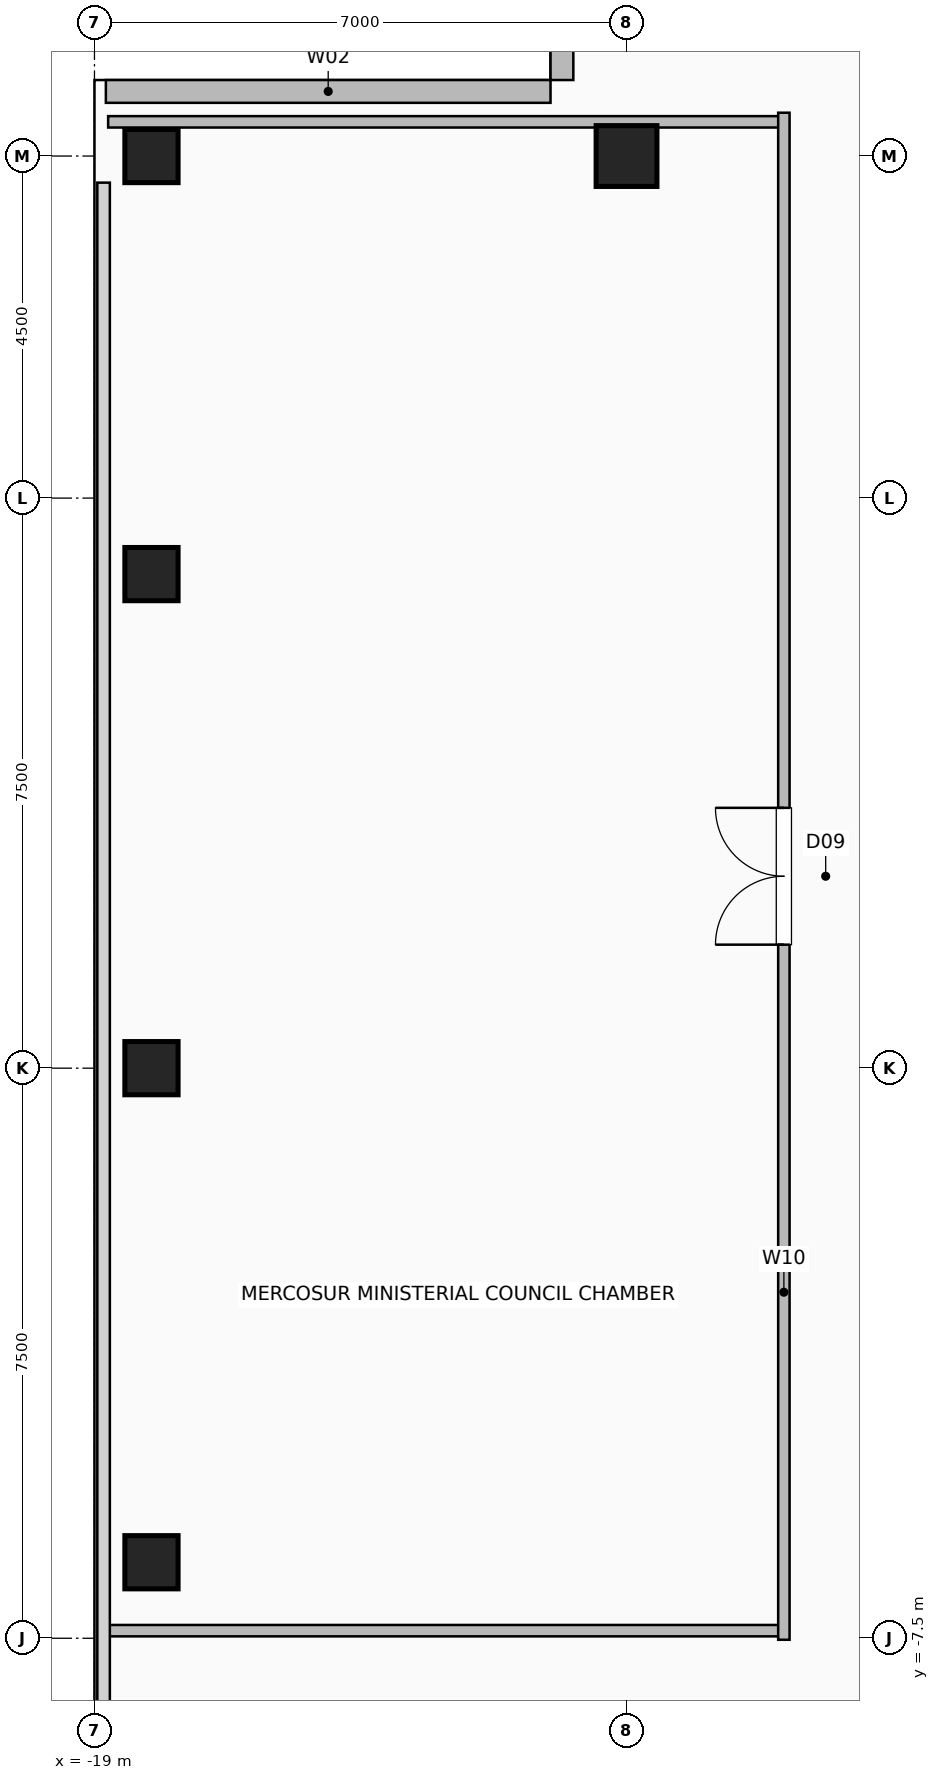
"""IFC4 building model, lengths in metres.
Left out: names, types, materials, properties, quantities, classifications, styles, units other than length and angle.
Written with IfcOpenShell. Run it as: python <this file> out.ifc"""

import sys

from ifc_helpers import new_model, si_unit, direction, frame, frame_2d, origin, origin_2d, place, context, subcontext, project, spatial, rectangle, hollow_rectangle, extrude, element, fill, save


model = new_model("IFC4")
c1 = context("Model", 3, precision=1e-05, world=origin(), true_north=direction((0.0, 1.0)))
c2 = subcontext(c1, "Body", "Model", "MODEL_VIEW")
j1 = project(units=[si_unit("LENGTHUNIT", "METRE"), si_unit("PLANEANGLEUNIT", "RADIAN")], contexts=[c1])
p1 = place(None, origin())
s1 = spatial("IfcSite", under=j1, at=p1, CompositionType="ELEMENT")
p2 = place(p1, origin())
s2 = spatial("IfcBuilding", under=s1, at=p2, CompositionType="ELEMENT")
p3 = place(p2, frame((0.0, 0.0, 243.2)))
s3 = spatial("IfcBuildingStorey", under=s2, at=p3, CompositionType="ELEMENT", Elevation=243.2)
for number, where, z_axis, x_axis in (
    (1, (-18.25, -6.5, 0.0), (0.0, 0.0, 1.0), (1.0, 0.0, 0.0)),
    (2, (-18.25, 0.0, 0.0), (0.0, 0.0, 1.0), (1.0, 0.0, 0.0)),
    (3, (-18.25, 6.5, 0.0), (0.0, 0.0, 1.0), (1.0, 0.0, 0.0)),
    (4, (-18.25, 12.0, 0.0), (0.0, 0.0, 1.0), (1.0, 0.0, 0.0)),
):
    element("IfcColumn", number, at=place(p3, frame(where, z_axis=z_axis, x_axis=x_axis)), inside=s3, PredefinedType="COLUMN", context=c2, shape_type="SweptSolid", body=[
        extrude(hollow_rectangle(XDim=0.7, YDim=0.7, WallThickness=0.035, at=origin_2d()), origin(), (0.0, 0.0, 1.0), 3.6),
    ])
p4 = place(p3, frame((-12.0, 12.0, 0.0), z_axis=(0.0, 0.0, 1.0), x_axis=(1.0, 0.0, 0.0)))
e5 = element("IfcColumn", 5, at=p4, inside=s3, PredefinedType="COLUMN", context=c2, shape_type="SweptSolid", body=[
    extrude(hollow_rectangle(XDim=0.8, YDim=0.8, WallThickness=0.04, at=origin_2d()), origin(), (0.0, 0.0, 1.0), 3.6),
])
p5 = place(p3, frame((-12.85, 18.85, 0.0), z_axis=(0.0, 0.0, 1.0), x_axis=(0.0, -1.0, 0.0)))
e6 = element("IfcWall", 6, at=p5, inside=s3, PredefinedType="SOLIDWALL", context=c2, shape_type="SweptSolid", body=[
    extrude(rectangle(XDim=5.85, YDim=0.3, at=frame_2d((2.925, 0.0))), origin(), (0.0, 0.0, 1.0), 3.36),
])
p6 = place(p5, frame((2.175, 0.0, 0.9)))
e7 = element("IfcOpeningElement", 7, at=p6, cuts=e6, PredefinedType="OPENING", context=c2, shape_type="SweptSolid", body=[
    extrude(rectangle(XDim=1.5, YDim=1.8, at=frame_2d((0.75, 0.9))), frame((0.0, 0.16, 0.0), z_axis=(0.0, -1.0, 0.0), x_axis=(1.0, 0.0, 0.0)), (0.0, 0.0, 1.0), 0.32),
])
p7 = place(p3, frame((-18.85, 12.85, 0.0), z_axis=(0.0, 0.0, 1.0), x_axis=(1.0, 0.0, 0.0)))
e8 = element("IfcWall", 8, at=p7, inside=s3, PredefinedType="SOLIDWALL", context=c2, shape_type="SweptSolid", body=[
    extrude(rectangle(XDim=5.85, YDim=0.3, at=frame_2d((2.925, 0.0))), origin(), (0.0, 0.0, 1.0), 3.36),
])
for number, where, z_axis, x_axis in (
    (9, (-18.82, -7.4, 0.0), (0.0, 0.0, 1.0), (1.0, 0.0, 0.0)),
    (10, (-18.82, 12.45, 0.0), (0.0, 0.0, 1.0), (1.0, 0.0, 0.0)),
):
    element("IfcWall", number, at=place(p3, frame(where, z_axis=z_axis, x_axis=x_axis)), inside=s3, PredefinedType="PARTITIONING", context=c2, shape_type="SweptSolid", body=[
        extrude(rectangle(XDim=8.89, YDim=0.15, at=frame_2d((4.445, 0.0))), origin(), (0.0, 0.0, 1.0), 3.36),
    ])
p8 = place(p3, frame((-9.93, -7.52, 0.0), z_axis=(0.0, 0.0, 1.0), x_axis=(0.0, 1.0, 0.0)))
e11 = element("IfcWall", 11, at=p8, inside=s3, PredefinedType="PARTITIONING", context=c2, shape_type="SweptSolid", body=[
    extrude(rectangle(XDim=20.09, YDim=0.15, at=frame_2d((10.045, 0.0))), origin(), (0.0, 0.0, 1.0), 3.36),
])
p9 = place(p8, frame((9.145, 0.0, 0.0)))
e12 = element("IfcOpeningElement", 12, at=p9, cuts=e11, PredefinedType="OPENING", context=c2, shape_type="SweptSolid", body=[
    extrude(rectangle(XDim=1.8, YDim=2.08, at=frame_2d((0.9, 1.04))), frame((0.0, 0.085, 0.0), z_axis=(0.0, -1.0, 0.0), x_axis=(1.0, 0.0, 0.0)), (0.0, 0.0, 1.0), 0.17),
])
p10 = place(p9, origin())
e13 = element("IfcDoor", 13, at=p10, inside=s3, OperationType="DOUBLE_DOOR_SINGLE_SWING", PredefinedType="DOOR", context=c2, shape_type="SweptSolid", body=[
    extrude(rectangle(XDim=1.8, YDim=2.08, at=frame_2d((0.9, 1.04))), frame((0.0, 0.025, 0.0), z_axis=(0.0, -1.0, 0.0), x_axis=(1.0, 0.0, 0.0)), (0.0, 0.0, 1.0), 0.05),
])
fill(e12, e13)
save(model, sys.argv[1])
